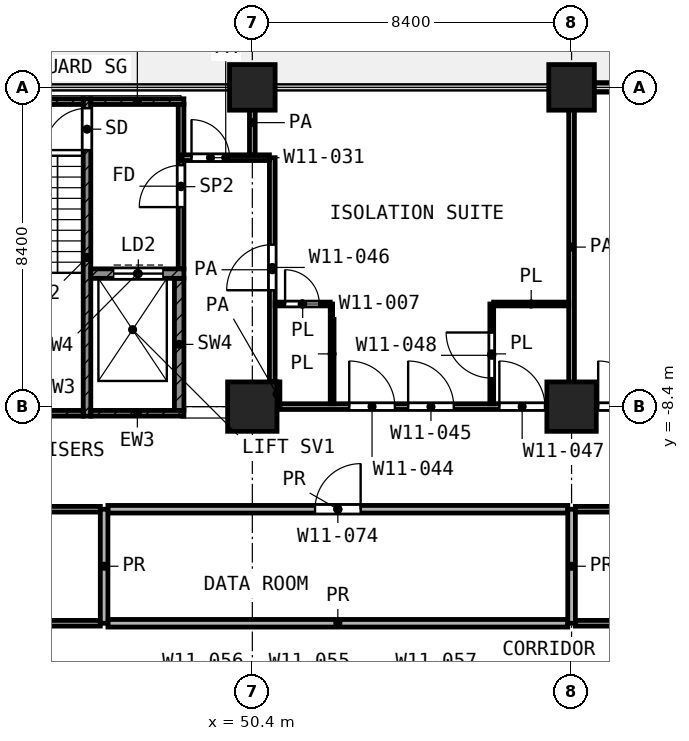
"""IFC4 building model, lengths in metres.
Left out: names, types, materials, properties, quantities, classifications, styles, units other than length and angle.
Written with IfcOpenShell. Run it as: python <this file> out.ifc"""

import sys

from ifc_helpers import new_model, si_unit, direction, frame, frame_2d, origin, origin_2d, place, context, subcontext, project, spatial, rectangle, extrude, element, fill, save


model = new_model("IFC4")
c1 = context("Model", 3, precision=1e-05, world=origin(), true_north=direction((0.0, 1.0)))
c2 = subcontext(c1, "Body", "Model", "MODEL_VIEW")
j1 = project(units=[si_unit("LENGTHUNIT", "METRE"), si_unit("PLANEANGLEUNIT", "RADIAN")], contexts=[c1])
p1 = place(None, origin())
s1 = spatial("IfcSite", under=j1, at=p1, CompositionType="ELEMENT")
p2 = place(p1, origin())
s2 = spatial("IfcBuilding", under=s1, at=p2, CompositionType="ELEMENT")
p3 = place(p2, frame((0.0, 0.0, 51.8)))
s3 = spatial("IfcBuildingStorey", under=s2, at=p3, CompositionType="ELEMENT", Elevation=51.8)
for number, where, z_axis, x_axis in (
    (1, (50.4, 0.0, 0.0), (0.0, 0.0, 1.0), (1.0, 0.0, 0.0)),
    (2, (58.8, 0.0, 0.0), (0.0, 0.0, 1.0), (1.0, 0.0, 0.0)),
):
    element("IfcColumn", number, at=place(p3, frame(where, z_axis=z_axis, x_axis=x_axis)), inside=s3, PredefinedType="COLUMN", context=c2, shape_type="SweptSolid", body=[
        extrude(rectangle(XDim=1.2, YDim=1.2, at=origin_2d()), origin(), (0.0, 0.0, 1.0), 4.2),
    ])
for number, where, z_axis, x_axis in (
    (3, (50.4, -8.4, 0.0), (0.0, 0.0, 1.0), (1.0, 0.0, 0.0)),
    (4, (58.8, -8.4, 0.0), (0.0, 0.0, 1.0), (1.0, 0.0, 0.0)),
):
    element("IfcColumn", number, at=place(p3, frame(where, z_axis=z_axis, x_axis=x_axis)), inside=s3, PredefinedType="COLUMN", context=c2, shape_type="SweptSolid", body=[
        extrude(rectangle(XDim=1.3, YDim=1.3, at=origin_2d()), origin(), (0.0, 0.0, 1.0), 4.2),
    ])
p4 = place(p3, frame((63.0, 0.0, 0.0), z_axis=(0.0, 0.0, 1.0), x_axis=(-1.0, 0.0, 0.0)))
e5 = element("IfcWall", 5, at=p4, inside=s3, PredefinedType="SOLIDWALL", context=c2, shape_type="SweptSolid", body=[
    extrude(rectangle(XDim=3.6, YDim=0.25, at=frame_2d((1.8, 0.0))), origin(), (0.0, 0.0, 1.0), 3.78),
])
p5 = place(p4, frame((0.9, 0.0, 0.0)))
e6 = element("IfcOpeningElement", 6, at=p5, cuts=e5, PredefinedType="OPENING", context=c2, shape_type="SweptSolid", body=[
    extrude(rectangle(XDim=1.8, YDim=2.1, at=frame_2d((0.9, 1.05))), frame((0.0, 0.135, 0.0), z_axis=(0.0, -1.0, 0.0), x_axis=(1.0, 0.0, 0.0)), (0.0, 0.0, 1.0), 0.27),
])
p6 = place(p3, frame((46.05, -8.65, 0.0), z_axis=(0.0, 0.0, 1.0), x_axis=(0.0, 1.0, 0.0)))
e7 = element("IfcWall", 7, at=p6, inside=s3, PredefinedType="SHEAR", context=c2, shape_type="SweptSolid", body=[
    extrude(rectangle(XDim=8.35, YDim=0.2, at=frame_2d((4.175, 0.0))), origin(), (0.0, 0.0, 1.0), 3.9),
])
p7 = place(p6, frame((7.0, 0.0, 0.0)))
e8 = element("IfcOpeningElement", 8, at=p7, cuts=e7, PredefinedType="OPENING", context=c2, shape_type="SweptSolid", body=[
    extrude(rectangle(XDim=1.1, YDim=2.1, at=frame_2d((0.55, 1.05))), frame((0.0, 0.11, 0.0), z_axis=(0.0, -1.0, 0.0), x_axis=(1.0, 0.0, 0.0)), (0.0, 0.0, 1.0), 0.22),
])
p8 = place(p3, frame((43.1, -0.375, 0.0), z_axis=(0.0, 0.0, 1.0), x_axis=(1.0, 0.0, 0.0)))
e9 = element("IfcWall", 9, at=p8, inside=s3, PredefinedType="SHEAR", context=c2, shape_type="SweptSolid", body=[
    extrude(rectangle(XDim=2.85, YDim=0.15, at=frame_2d((1.425, 0.0))), origin(), (0.0, 0.0, 1.0), 3.9),
])
p9 = place(p3, frame((46.15, -0.375, 0.0), z_axis=(0.0, 0.0, 1.0), x_axis=(1.0, 0.0, 0.0)))
e10 = element("IfcWall", 10, at=p9, inside=s3, PredefinedType="SHEAR", context=c2, shape_type="SweptSolid", body=[
    extrude(rectangle(XDim=2.45, YDim=0.15, at=frame_2d((1.225, 0.0))), origin(), (0.0, 0.0, 1.0), 3.9),
])
p10 = place(p3, frame((43.1, -8.575, 0.0), z_axis=(0.0, 0.0, 1.0), x_axis=(1.0, 0.0, 0.0)))
e11 = element("IfcWall", 11, at=p10, inside=s3, PredefinedType="SHEAR", context=c2, shape_type="SweptSolid", body=[
    extrude(rectangle(XDim=2.85, YDim=0.15, at=frame_2d((1.425, 0.0))), origin(), (0.0, 0.0, 1.0), 3.9),
])
p11 = place(p3, frame((46.15, -8.575, 0.0), z_axis=(0.0, 0.0, 1.0), x_axis=(1.0, 0.0, 0.0)))
e12 = element("IfcWall", 12, at=p11, inside=s3, PredefinedType="SHEAR", context=c2, shape_type="SweptSolid", body=[
    extrude(rectangle(XDim=2.45, YDim=0.15, at=frame_2d((1.225, 0.0))), origin(), (0.0, 0.0, 1.0), 3.9),
])
p12 = place(p3, frame((46.15, -4.9, 0.0), z_axis=(0.0, 0.0, 1.0), x_axis=(1.0, 0.0, 0.0)))
e13 = element("IfcWall", 13, at=p12, inside=s3, PredefinedType="SHEAR", context=c2, shape_type="SweptSolid", body=[
    extrude(rectangle(XDim=2.45, YDim=0.25, at=frame_2d((1.225, 0.0))), origin(), (0.0, 0.0, 1.0), 3.9),
])
p13 = place(p12, frame((0.6, 0.0, 0.0)))
e14 = element("IfcOpeningElement", 14, at=p13, cuts=e13, PredefinedType="OPENING", context=c2, shape_type="SweptSolid", body=[
    extrude(rectangle(XDim=1.3, YDim=2.1, at=frame_2d((0.65, 1.05))), frame((0.0, 0.135, 0.0), z_axis=(0.0, -1.0, 0.0), x_axis=(1.0, 0.0, 0.0)), (0.0, 0.0, 1.0), 0.27),
])
p14 = place(p3, frame((48.475, -8.5, 0.0), z_axis=(0.0, 0.0, 1.0), x_axis=(0.0, 1.0, 0.0)))
e15 = element("IfcWall", 15, at=p14, inside=s3, PredefinedType="SHEAR", context=c2, shape_type="SweptSolid", body=[
    extrude(rectangle(XDim=3.475, YDim=0.25, at=frame_2d((1.738, 0.0))), origin(), (0.0, 0.0, 1.0), 3.9),
])
p15 = place(p3, frame((48.525, -4.775, 0.0), z_axis=(0.0, 0.0, 1.0), x_axis=(0.0, 1.0, 0.0)))
e16 = element("IfcWall", 16, at=p15, inside=s3, PredefinedType="PARTITIONING", context=c2, shape_type="SweptSolid", body=[
    extrude(rectangle(XDim=4.325, YDim=0.15, at=frame_2d((2.163, 0.0))), origin(), (0.0, 0.0, 1.0), 3.9),
])
p16 = place(p15, frame((1.625, 0.0, 0.0)))
e17 = element("IfcOpeningElement", 17, at=p16, cuts=e16, PredefinedType="OPENING", context=c2, shape_type="SweptSolid", body=[
    extrude(rectangle(XDim=1.1, YDim=2.1, at=frame_2d((0.55, 1.05))), frame((0.0, 0.085, 0.0), z_axis=(0.0, -1.0, 0.0), x_axis=(1.0, 0.0, 0.0)), (0.0, 0.0, 1.0), 0.17),
])
p17 = place(p3, frame((51.0, -5.7, 0.0), z_axis=(0.0, 0.0, 1.0), x_axis=(1.0, 0.0, 0.0)))
e18 = element("IfcWall", 18, at=p17, inside=s3, PredefinedType="PARTITIONING", context=c2, shape_type="SweptSolid", body=[
    extrude(rectangle(XDim=1.45, YDim=0.1, at=frame_2d((0.725, 0.0))), origin(), (0.0, 0.0, 1.0), 3.9),
])
p18 = place(p17, frame((0.262, 0.0, 0.0)))
e19 = element("IfcOpeningElement", 19, at=p18, cuts=e18, PredefinedType="OPENING", context=c2, shape_type="SweptSolid", body=[
    extrude(rectangle(XDim=0.9, YDim=2.1, at=frame_2d((0.45, 1.05))), frame((0.0, 0.06, 0.0), z_axis=(0.0, -1.0, 0.0), x_axis=(1.0, 0.0, 0.0)), (0.0, 0.0, 1.0), 0.12),
])
p19 = place(p3, frame((56.75, -5.7, 0.0), z_axis=(0.0, 0.0, 1.0), x_axis=(1.0, 0.0, 0.0)))
e20 = element("IfcWall", 20, at=p19, inside=s3, PredefinedType="PARTITIONING", context=c2, shape_type="SweptSolid", body=[
    extrude(rectangle(XDim=1.975, YDim=0.1, at=frame_2d((0.988, 0.0))), origin(), (0.0, 0.0, 1.0), 3.9),
])
p20 = place(p3, frame((52.5, -8.325, 0.0), z_axis=(0.0, 0.0, 1.0), x_axis=(0.0, 1.0, 0.0)))
e21 = element("IfcWall", 21, at=p20, inside=s3, PredefinedType="PARTITIONING", context=c2, shape_type="SweptSolid", body=[
    extrude(rectangle(XDim=2.625, YDim=0.1, at=frame_2d((1.312, 0.0))), origin(), (0.0, 0.0, 1.0), 3.9),
])
p21 = place(p3, frame((56.7, -8.325, 0.0), z_axis=(0.0, 0.0, 1.0), x_axis=(0.0, 1.0, 0.0)))
e22 = element("IfcWall", 22, at=p21, inside=s3, PredefinedType="PARTITIONING", context=c2, shape_type="SweptSolid", body=[
    extrude(rectangle(XDim=2.625, YDim=0.1, at=frame_2d((1.312, 0.0))), origin(), (0.0, 0.0, 1.0), 3.9),
])
p22 = place(p21, frame((0.675, 0.0, 0.0)))
e23 = element("IfcOpeningElement", 23, at=p22, cuts=e22, PredefinedType="OPENING", context=c2, shape_type="SweptSolid", body=[
    extrude(rectangle(XDim=1.2, YDim=2.1, at=frame_2d((0.6, 1.05))), frame((0.0, 0.06, 0.0), z_axis=(0.0, -1.0, 0.0), x_axis=(1.0, 0.0, 0.0)), (0.0, 0.0, 1.0), 0.12),
])
p23 = place(p3, frame((29.475, -14.1, 0.0), z_axis=(0.0, 0.0, 1.0), x_axis=(1.0, 0.0, 0.0)))
e24 = element("IfcWall", 24, at=p23, inside=s3, PredefinedType="PARTITIONING", context=c2, shape_type="SweptSolid", body=[
    extrude(rectangle(XDim=16.925, YDim=0.15, at=frame_2d((8.462, 0.0))), origin(), (0.0, 0.0, 1.0), 3.9),
])
p24 = place(p23, frame((9.225, 0.0, 0.0)))
e25 = element("IfcOpeningElement", 25, at=p24, cuts=e24, PredefinedType="OPENING", context=c2, shape_type="SweptSolid", body=[
    extrude(rectangle(XDim=1.2, YDim=2.1, at=frame_2d((0.6, 1.05))), frame((0.0, 0.085, 0.0), z_axis=(0.0, -1.0, 0.0), x_axis=(1.0, 0.0, 0.0)), (0.0, 0.0, 1.0), 0.17),
])
p25 = place(p3, frame((58.9, -14.1, 0.0), z_axis=(0.0, 0.0, 1.0), x_axis=(1.0, 0.0, 0.0)))
e26 = element("IfcWall", 26, at=p25, inside=s3, PredefinedType="PARTITIONING", context=c2, shape_type="SweptSolid", body=[
    extrude(rectangle(XDim=18.125, YDim=0.15, at=frame_2d((9.062, 0.0))), origin(), (0.0, 0.0, 1.0), 3.9),
])
p26 = place(p25, frame((5.9, 0.0, 0.0)))
e27 = element("IfcOpeningElement", 27, at=p26, cuts=e26, PredefinedType="OPENING", context=c2, shape_type="SweptSolid", body=[
    extrude(rectangle(XDim=1.2, YDim=2.1, at=frame_2d((0.6, 1.05))), frame((0.0, 0.085, 0.0), z_axis=(0.0, -1.0, 0.0), x_axis=(1.0, 0.0, 0.0)), (0.0, 0.0, 1.0), 0.17),
])
p27 = place(p25, frame((14.45, 0.0, 0.0)))
e28 = element("IfcOpeningElement", 28, at=p27, cuts=e26, PredefinedType="OPENING", context=c2, shape_type="SweptSolid", body=[
    extrude(rectangle(XDim=0.9, YDim=2.1, at=frame_2d((0.45, 1.05))), frame((0.0, 0.085, 0.0), z_axis=(0.0, -1.0, 0.0), x_axis=(1.0, 0.0, 0.0)), (0.0, 0.0, 1.0), 0.17),
])
p28 = place(p3, frame((29.475, -11.1, 0.0), z_axis=(0.0, 0.0, 1.0), x_axis=(1.0, 0.0, 0.0)))
e29 = element("IfcWall", 29, at=p28, inside=s3, PredefinedType="PARTITIONING", context=c2, shape_type="SweptSolid", body=[
    extrude(rectangle(XDim=16.925, YDim=0.15, at=frame_2d((8.462, 0.0))), origin(), (0.0, 0.0, 1.0), 3.9),
])
p29 = place(p3, frame((58.9, -11.1, 0.0), z_axis=(0.0, 0.0, 1.0), x_axis=(1.0, 0.0, 0.0)))
e30 = element("IfcWall", 30, at=p29, inside=s3, PredefinedType="PARTITIONING", context=c2, shape_type="SweptSolid", body=[
    extrude(rectangle(XDim=18.125, YDim=0.15, at=frame_2d((9.062, 0.0))), origin(), (0.0, 0.0, 1.0), 3.9),
])
p30 = place(p3, frame((51.125, -8.4, 0.0), z_axis=(0.0, 0.0, 1.0), x_axis=(1.0, 0.0, 0.0)))
e31 = element("IfcWall", 31, at=p30, inside=s3, PredefinedType="PARTITIONING", context=c2, shape_type="SweptSolid", body=[
    extrude(rectangle(XDim=28.595, YDim=0.15, at=frame_2d((14.297, 0.0))), origin(), (0.0, 0.0, 1.0), 3.9),
])
p31 = place(p30, frame((1.825, 0.0, 0.0)))
e32 = element("IfcOpeningElement", 32, at=p31, cuts=e31, PredefinedType="OPENING", context=c2, shape_type="SweptSolid", body=[
    extrude(rectangle(XDim=1.2, YDim=2.1, at=frame_2d((0.6, 1.05))), frame((0.0, 0.085, 0.0), z_axis=(0.0, -1.0, 0.0), x_axis=(1.0, 0.0, 0.0)), (0.0, 0.0, 1.0), 0.17),
])
p32 = place(p30, frame((3.375, 0.0, 0.0)))
e33 = element("IfcOpeningElement", 33, at=p32, cuts=e31, PredefinedType="OPENING", context=c2, shape_type="SweptSolid", body=[
    extrude(rectangle(XDim=1.2, YDim=2.1, at=frame_2d((0.6, 1.05))), frame((0.0, 0.085, 0.0), z_axis=(0.0, -1.0, 0.0), x_axis=(1.0, 0.0, 0.0)), (0.0, 0.0, 1.0), 0.17),
])
p33 = place(p30, frame((5.775, 0.0, 0.0)))
e34 = element("IfcOpeningElement", 34, at=p33, cuts=e31, PredefinedType="OPENING", context=c2, shape_type="SweptSolid", body=[
    extrude(rectangle(XDim=1.2, YDim=2.1, at=frame_2d((0.6, 1.05))), frame((0.0, 0.085, 0.0), z_axis=(0.0, -1.0, 0.0), x_axis=(1.0, 0.0, 0.0)), (0.0, 0.0, 1.0), 0.17),
])
p34 = place(p30, frame((8.375, 0.0, 0.0)))
e35 = element("IfcOpeningElement", 35, at=p34, cuts=e31, PredefinedType="OPENING", context=c2, shape_type="SweptSolid", body=[
    extrude(rectangle(XDim=1.2, YDim=2.1, at=frame_2d((0.6, 1.05))), frame((0.0, 0.085, 0.0), z_axis=(0.0, -1.0, 0.0), x_axis=(1.0, 0.0, 0.0)), (0.0, 0.0, 1.0), 0.17),
])
p35 = place(p30, frame((13.675, 0.0, 0.0)))
e36 = element("IfcOpeningElement", 36, at=p35, cuts=e31, PredefinedType="OPENING", context=c2, shape_type="SweptSolid", body=[
    extrude(rectangle(XDim=1.2, YDim=2.1, at=frame_2d((0.6, 1.05))), frame((0.0, 0.085, 0.0), z_axis=(0.0, -1.0, 0.0), x_axis=(1.0, 0.0, 0.0)), (0.0, 0.0, 1.0), 0.17),
])
p36 = place(p30, frame((16.775, 0.0, 0.0)))
e37 = element("IfcOpeningElement", 37, at=p36, cuts=e31, PredefinedType="OPENING", context=c2, shape_type="SweptSolid", body=[
    extrude(rectangle(XDim=0.9, YDim=2.1, at=frame_2d((0.45, 1.05))), frame((0.0, 0.085, 0.0), z_axis=(0.0, -1.0, 0.0), x_axis=(1.0, 0.0, 0.0)), (0.0, 0.0, 1.0), 0.17),
])
p37 = place(p30, frame((22.275, 0.0, 0.0)))
e38 = element("IfcOpeningElement", 38, at=p37, cuts=e31, PredefinedType="OPENING", context=c2, shape_type="SweptSolid", body=[
    extrude(rectangle(XDim=1.5, YDim=2.1, at=frame_2d((0.75, 1.05))), frame((0.0, 0.085, 0.0), z_axis=(0.0, -1.0, 0.0), x_axis=(1.0, 0.0, 0.0)), (0.0, 0.0, 1.0), 0.17),
])
p38 = place(p3, frame((48.55, -1.85, 0.0), z_axis=(0.0, 0.0, 1.0), x_axis=(1.0, 0.0, 0.0)))
e39 = element("IfcWall", 39, at=p38, inside=s3, PredefinedType="PARTITIONING", context=c2, shape_type="SweptSolid", body=[
    extrude(rectangle(XDim=2.3, YDim=0.15, at=frame_2d((1.15, 0.0))), origin(), (0.0, 0.0, 1.0), 3.9),
])
p39 = place(p38, frame((0.25, 0.0, 0.0)))
e40 = element("IfcOpeningElement", 40, at=p39, cuts=e39, PredefinedType="OPENING", context=c2, shape_type="SweptSolid", body=[
    extrude(rectangle(XDim=1.0, YDim=2.1, at=frame_2d((0.5, 1.05))), frame((0.0, 0.085, 0.0), z_axis=(0.0, -1.0, 0.0), x_axis=(1.0, 0.0, 0.0)), (0.0, 0.0, 1.0), 0.17),
])
p40 = place(p3, frame((50.4, -1.775, 0.0), z_axis=(0.0, 0.0, 1.0), x_axis=(0.0, 1.0, 0.0)))
e41 = element("IfcWall", 41, at=p40, inside=s3, PredefinedType="PARTITIONING", context=c2, shape_type="SweptSolid", body=[
    extrude(rectangle(XDim=1.695, YDim=0.15, at=frame_2d((0.847, 0.0))), origin(), (0.0, 0.0, 1.0), 3.9),
])
p41 = place(p3, frame((50.925, -7.748, 0.0), z_axis=(0.0, 0.0, 1.0), x_axis=(0.0, 1.0, 0.0)))
e42 = element("IfcWall", 42, at=p41, inside=s3, PredefinedType="PARTITIONING", context=c2, shape_type="SweptSolid", body=[
    extrude(rectangle(XDim=5.898, YDim=0.15, at=frame_2d((2.949, 0.0))), origin(), (0.0, 0.0, 1.0), 3.9),
])
p42 = place(p41, frame((2.41, 0.0, 0.0)))
e43 = element("IfcOpeningElement", 43, at=p42, cuts=e42, PredefinedType="OPENING", context=c2, shape_type="SweptSolid", body=[
    extrude(rectangle(XDim=1.2, YDim=2.1, at=frame_2d((0.6, 1.05))), frame((0.0, 0.085, 0.0), z_axis=(0.0, -1.0, 0.0), x_axis=(1.0, 0.0, 0.0)), (0.0, 0.0, 1.0), 0.17),
])
p43 = place(p3, frame((51.05, -8.4, 0.0), z_axis=(0.0, 0.0, 1.0), x_axis=(0.0, 1.0, 0.0)))
e44 = element("IfcWall", 44, at=p43, inside=s3, PredefinedType="PARTITIONING", context=c2, shape_type="SweptSolid", body=[
    extrude(rectangle(XDim=0.65, YDim=0.15, at=frame_2d((0.325, 0.0))), origin(), (0.0, 0.0, 1.0), 3.9),
])
p44 = place(p3, frame((58.8, -8.325, 0.0), z_axis=(0.0, 0.0, 1.0), x_axis=(0.0, 1.0, 0.0)))
e45 = element("IfcWall", 45, at=p44, inside=s3, PredefinedType="PARTITIONING", context=c2, shape_type="SweptSolid", body=[
    extrude(rectangle(XDim=8.245, YDim=0.15, at=frame_2d((4.123, 0.0))), origin(), (0.0, 0.0, 1.0), 3.9),
])
p45 = place(p3, frame((46.6, -14.1, 0.0), z_axis=(0.0, 0.0, 1.0), x_axis=(1.0, 0.0, 0.0)))
e46 = element("IfcWall", 46, at=p45, inside=s3, PredefinedType="PARTITIONING", context=c2, shape_type="SweptSolid", body=[
    extrude(rectangle(XDim=12.1, YDim=0.2, at=frame_2d((6.05, 0.0))), origin(), (0.0, 0.0, 1.0), 3.9),
])
p46 = place(p3, frame((46.6, -11.1, 0.0), z_axis=(0.0, 0.0, 1.0), x_axis=(1.0, 0.0, 0.0)))
e47 = element("IfcWall", 47, at=p46, inside=s3, PredefinedType="PARTITIONING", context=c2, shape_type="SweptSolid", body=[
    extrude(rectangle(XDim=12.1, YDim=0.2, at=frame_2d((6.05, 0.0))), origin(), (0.0, 0.0, 1.0), 3.9),
])
p47 = place(p46, frame((5.45, 0.0, 0.0)))
e48 = element("IfcOpeningElement", 48, at=p47, cuts=e47, PredefinedType="OPENING", context=c2, shape_type="SweptSolid", body=[
    extrude(rectangle(XDim=1.2, YDim=2.1, at=frame_2d((0.6, 1.05))), frame((0.0, 0.11, 0.0), z_axis=(0.0, -1.0, 0.0), x_axis=(1.0, 0.0, 0.0)), (0.0, 0.0, 1.0), 0.22),
])
for number, where, z_axis, x_axis in (
    (49, (46.5, -14.1, 0.0), (0.0, 0.0, 1.0), (0.0, 1.0, 0.0)),
    (50, (58.8, -14.1, 0.0), (0.0, 0.0, 1.0), (0.0, 1.0, 0.0)),
):
    element("IfcWall", number, at=place(p3, frame(where, z_axis=z_axis, x_axis=x_axis)), inside=s3, PredefinedType="PARTITIONING", context=c2, shape_type="SweptSolid", body=[
        extrude(rectangle(XDim=3.0, YDim=0.2, at=frame_2d((1.5, 0.0))), origin(), (0.0, 0.0, 1.0), 3.9),
    ])
p48 = place(p7, origin())
e51 = element("IfcDoor", 51, at=p48, inside=s3, OperationType="SINGLE_SWING_LEFT", PredefinedType="DOOR", context=c2, shape_type="SweptSolid", body=[
    extrude(rectangle(XDim=1.1, YDim=2.1, at=frame_2d((0.55, 1.05))), frame((0.0, 0.025, 0.0), z_axis=(0.0, -1.0, 0.0), x_axis=(1.0, 0.0, 0.0)), (0.0, 0.0, 1.0), 0.05),
])
fill(e8, e51)
p49 = place(p13, origin())
e52 = element("IfcDoor", 52, at=p49, inside=s3, OperationType="DOUBLE_DOOR_SLIDING", PredefinedType="DOOR", context=c2, shape_type="SweptSolid", body=[
    extrude(rectangle(XDim=1.3, YDim=2.1, at=frame_2d((0.65, 1.05))), frame((0.0, 0.025, 0.0), z_axis=(0.0, -1.0, 0.0), x_axis=(1.0, 0.0, 0.0)), (0.0, 0.0, 1.0), 0.05),
])
fill(e14, e52)
p50 = place(p16, origin())
e53 = element("IfcDoor", 53, at=p50, inside=s3, OperationType="SINGLE_SWING_LEFT", PredefinedType="DOOR", context=c2, shape_type="SweptSolid", body=[
    extrude(rectangle(XDim=1.1, YDim=2.1, at=frame_2d((0.55, 1.05))), frame((0.0, 0.025, 0.0), z_axis=(0.0, -1.0, 0.0), x_axis=(1.0, 0.0, 0.0)), (0.0, 0.0, 1.0), 0.05),
])
fill(e17, e53)
p51 = place(p39, origin())
e54 = element("IfcDoor", 54, at=p51, inside=s3, OperationType="SINGLE_SWING_LEFT", PredefinedType="DOOR", context=c2, shape_type="SweptSolid", body=[
    extrude(rectangle(XDim=1.0, YDim=2.1, at=frame_2d((0.5, 1.05))), frame((0.0, 0.025, 0.0), z_axis=(0.0, -1.0, 0.0), x_axis=(1.0, 0.0, 0.0)), (0.0, 0.0, 1.0), 0.05),
])
fill(e40, e54)
p52 = place(p31, origin())
e55 = element("IfcDoor", 55, at=p52, inside=s3, OperationType="SINGLE_SWING_LEFT", PredefinedType="DOOR", context=c2, shape_type="SweptSolid", body=[
    extrude(rectangle(XDim=1.2, YDim=2.1, at=frame_2d((0.6, 1.05))), frame((0.0, 0.025, 0.0), z_axis=(0.0, -1.0, 0.0), x_axis=(1.0, 0.0, 0.0)), (0.0, 0.0, 1.0), 0.05),
])
fill(e32, e55)
p53 = place(p32, origin())
e56 = element("IfcDoor", 56, at=p53, inside=s3, OperationType="SINGLE_SWING_LEFT", PredefinedType="DOOR", context=c2, shape_type="SweptSolid", body=[
    extrude(rectangle(XDim=1.2, YDim=2.1, at=frame_2d((0.6, 1.05))), frame((0.0, 0.025, 0.0), z_axis=(0.0, -1.0, 0.0), x_axis=(1.0, 0.0, 0.0)), (0.0, 0.0, 1.0), 0.05),
])
fill(e33, e56)
p54 = place(p42, origin())
e57 = element("IfcDoor", 57, at=p54, inside=s3, OperationType="SINGLE_SWING_LEFT", PredefinedType="DOOR", context=c2, shape_type="SweptSolid", body=[
    extrude(rectangle(XDim=1.2, YDim=2.1, at=frame_2d((0.6, 1.05))), frame((0.0, 0.025, 0.0), z_axis=(0.0, -1.0, 0.0), x_axis=(1.0, 0.0, 0.0)), (0.0, 0.0, 1.0), 0.05),
])
fill(e43, e57)
p55 = place(p33, origin())
e58 = element("IfcDoor", 58, at=p55, inside=s3, OperationType="SINGLE_SWING_LEFT", PredefinedType="DOOR", context=c2, shape_type="SweptSolid", body=[
    extrude(rectangle(XDim=1.2, YDim=2.1, at=frame_2d((0.6, 1.05))), frame((0.0, 0.025, 0.0), z_axis=(0.0, -1.0, 0.0), x_axis=(1.0, 0.0, 0.0)), (0.0, 0.0, 1.0), 0.05),
])
fill(e34, e58)
p56 = place(p22, origin())
e59 = element("IfcDoor", 59, at=p56, inside=s3, OperationType="SINGLE_SWING_RIGHT", PredefinedType="DOOR", context=c2, shape_type="SweptSolid", body=[
    extrude(rectangle(XDim=1.2, YDim=2.1, at=frame_2d((0.6, 1.05))), frame((0.0, 0.025, 0.0), z_axis=(0.0, -1.0, 0.0), x_axis=(1.0, 0.0, 0.0)), (0.0, 0.0, 1.0), 0.05),
])
fill(e23, e59)
p57 = place(p18, origin())
e60 = element("IfcDoor", 60, at=p57, inside=s3, OperationType="SINGLE_SWING_LEFT", PredefinedType="DOOR", context=c2, shape_type="SweptSolid", body=[
    extrude(rectangle(XDim=0.9, YDim=2.1, at=frame_2d((0.45, 1.05))), frame((0.0, 0.025, 0.0), z_axis=(0.0, -1.0, 0.0), x_axis=(1.0, 0.0, 0.0)), (0.0, 0.0, 1.0), 0.05),
])
fill(e19, e60)
p58 = place(p34, origin())
e61 = element("IfcDoor", 61, at=p58, inside=s3, OperationType="SINGLE_SWING_LEFT", PredefinedType="DOOR", context=c2, shape_type="SweptSolid", body=[
    extrude(rectangle(XDim=1.2, YDim=2.1, at=frame_2d((0.6, 1.05))), frame((0.0, 0.025, 0.0), z_axis=(0.0, -1.0, 0.0), x_axis=(1.0, 0.0, 0.0)), (0.0, 0.0, 1.0), 0.05),
])
fill(e35, e61)
p59 = place(p47, origin())
e62 = element("IfcDoor", 62, at=p59, inside=s3, OperationType="SINGLE_SWING_RIGHT", PredefinedType="DOOR", context=c2, shape_type="SweptSolid", body=[
    extrude(rectangle(XDim=1.2, YDim=2.1, at=frame_2d((0.6, 1.05))), frame((0.0, 0.025, 0.0), z_axis=(0.0, -1.0, 0.0), x_axis=(1.0, 0.0, 0.0)), (0.0, 0.0, 1.0), 0.05),
])
fill(e48, e62)
save(model, sys.argv[1])
